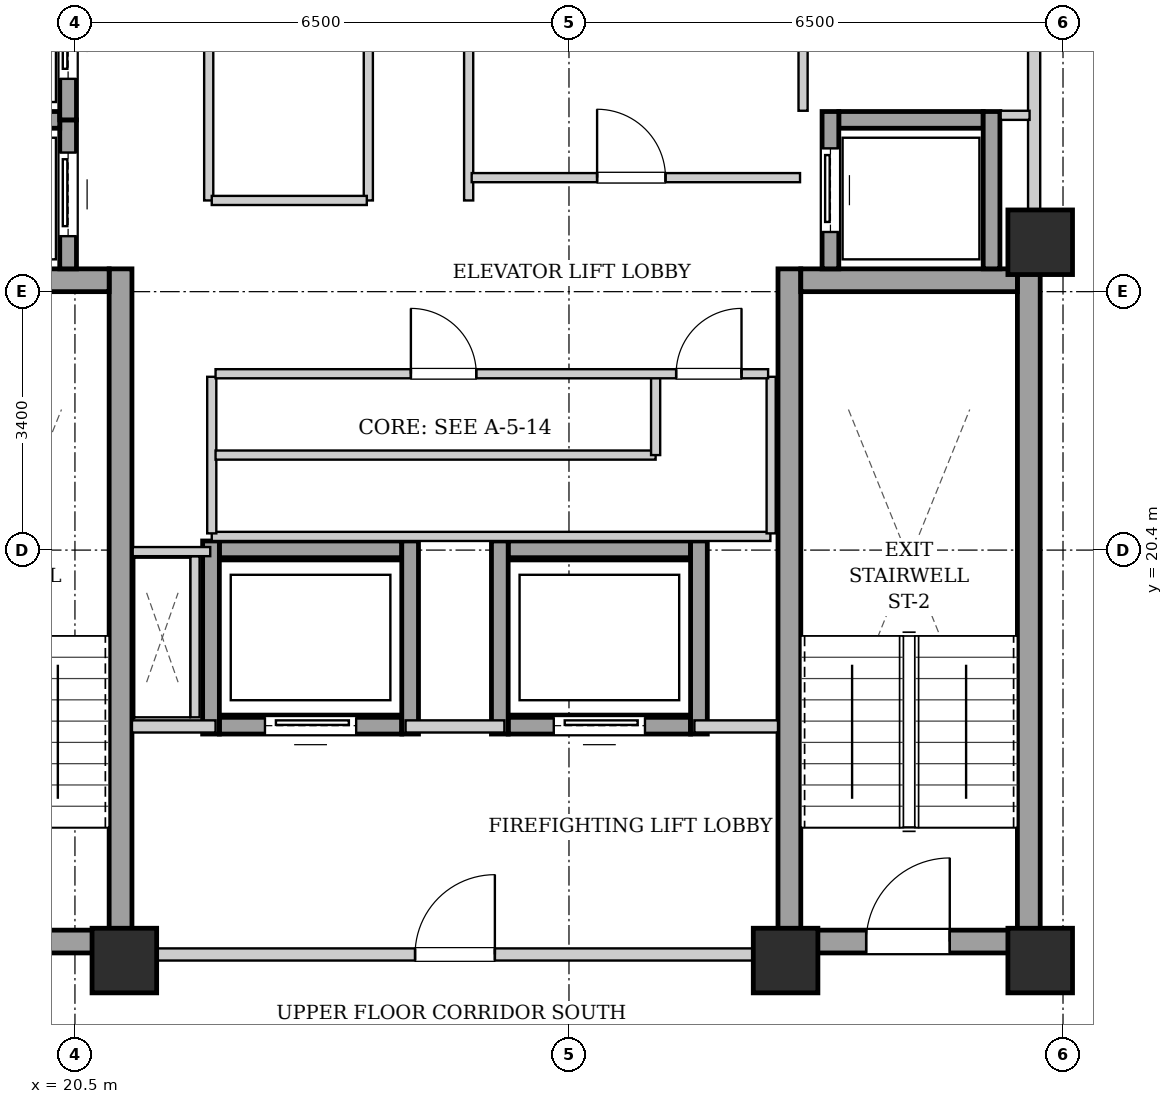
"""IFC4 building model, lengths in metres.
Left out: names, types, materials, properties, quantities, classifications, styles, units other than length and angle.
Written with IfcOpenShell. Run it as: python <this file> out.ifc"""

import sys

from ifc_helpers import new_model, si_unit, direction, frame, frame_2d, origin, origin_2d, place, context, subcontext, project, spatial, rectangle, extrude, element, fill, save


model = new_model("IFC4")
c1 = context("Model", 3, precision=1e-05, world=origin(), true_north=direction((0.0, 1.0)))
c2 = subcontext(c1, "Body", "Model", "MODEL_VIEW")
j1 = project(units=[si_unit("LENGTHUNIT", "METRE"), si_unit("PLANEANGLEUNIT", "RADIAN")], contexts=[c1])
p1 = place(None, origin())
s1 = spatial("IfcSite", under=j1, at=p1, CompositionType="ELEMENT")
p2 = place(p1, origin())
s2 = spatial("IfcBuilding", under=s1, at=p2, CompositionType="ELEMENT")
p3 = place(p2, frame((0.0, 0.0, 181.0)))
s3 = spatial("IfcBuildingStorey", under=s2, at=p3, CompositionType="ELEMENT", Elevation=181.0)
for number, where, z_axis, x_axis in (
    (1, (21.15, 15.0, 0.0), (0.0, 0.0, 1.0), (1.0, 0.0, 0.0)),
    (2, (29.85, 15.0, 0.0), (0.0, 0.0, 1.0), (1.0, 0.0, 0.0)),
    (3, (33.2, 15.0, 0.0), (0.0, 0.0, 1.0), (1.0, 0.0, 0.0)),
    (4, (33.2, 24.45, 0.0), (0.0, 0.0, 1.0), (1.0, 0.0, 0.0)),
):
    element("IfcColumn", number, at=place(p3, frame(where, z_axis=z_axis, x_axis=x_axis)), inside=s3, PredefinedType="COLUMN", context=c2, shape_type="SweptSolid", body=[
        extrude(rectangle(XDim=0.85, YDim=0.85, at=origin_2d()), origin(), (0.0, 0.0, 1.0), 3.3),
    ])
p4 = place(p3, frame((21.1, 15.1, 0.0), z_axis=(0.0, 0.0, 1.0), x_axis=(0.0, 1.0, 0.0)))
e5 = element("IfcWall", 5, at=p4, inside=s3, PredefinedType="SHEAR", context=c2, shape_type="SweptSolid", body=[
    extrude(rectangle(XDim=9.0, YDim=0.3, at=frame_2d((4.5, 0.0))), origin(), (0.0, 0.0, 1.0), 3.04),
])
p5 = place(p3, frame((18.1, 23.95, 0.0), z_axis=(0.0, 0.0, 1.0), x_axis=(1.0, 0.0, 0.0)))
e6 = element("IfcWall", 6, at=p5, inside=s3, PredefinedType="SHEAR", context=c2, shape_type="SweptSolid", body=[
    extrude(rectangle(XDim=2.85, YDim=0.3, at=frame_2d((1.425, 0.0))), origin(), (0.0, 0.0, 1.0), 3.04),
])
p6 = place(p3, frame((18.1, 15.25, 0.0), z_axis=(0.0, 0.0, 1.0), x_axis=(1.0, 0.0, 0.0)))
e7 = element("IfcWall", 7, at=p6, inside=s3, PredefinedType="SHEAR", context=c2, shape_type="SweptSolid", body=[
    extrude(rectangle(XDim=2.85, YDim=0.3, at=frame_2d((1.425, 0.0))), origin(), (0.0, 0.0, 1.0), 3.04),
])
p7 = place(p6, frame((0.86, 0.0, 0.0)))
e8 = element("IfcOpeningElement", 8, at=p7, cuts=e7, PredefinedType="OPENING", context=c2, shape_type="SweptSolid", body=[
    extrude(rectangle(XDim=1.1, YDim=2.05, at=frame_2d((0.55, 1.025))), frame((0.0, 0.16, 0.0), z_axis=(0.0, -1.0, 0.0), x_axis=(1.0, 0.0, 0.0)), (0.0, 0.0, 1.0), 0.32),
])
for number, where, z_axis, x_axis in (
    (9, (29.9, 15.1, 0.0), (0.0, 0.0, 1.0), (0.0, 1.0, 0.0)),
    (10, (33.05, 15.1, 0.0), (0.0, 0.0, 1.0), (0.0, 1.0, 0.0)),
):
    element("IfcWall", number, at=place(p3, frame(where, z_axis=z_axis, x_axis=x_axis)), inside=s3, PredefinedType="SHEAR", context=c2, shape_type="SweptSolid", body=[
        extrude(rectangle(XDim=9.0, YDim=0.3, at=frame_2d((4.5, 0.0))), origin(), (0.0, 0.0, 1.0), 3.04),
    ])
p8 = place(p3, frame((30.05, 23.95, 0.0), z_axis=(0.0, 0.0, 1.0), x_axis=(1.0, 0.0, 0.0)))
e11 = element("IfcWall", 11, at=p8, inside=s3, PredefinedType="SHEAR", context=c2, shape_type="SweptSolid", body=[
    extrude(rectangle(XDim=2.85, YDim=0.3, at=frame_2d((1.425, 0.0))), origin(), (0.0, 0.0, 1.0), 3.04),
])
p9 = place(p3, frame((30.05, 15.25, 0.0), z_axis=(0.0, 0.0, 1.0), x_axis=(1.0, 0.0, 0.0)))
e12 = element("IfcWall", 12, at=p9, inside=s3, PredefinedType="SHEAR", context=c2, shape_type="SweptSolid", body=[
    extrude(rectangle(XDim=2.85, YDim=0.3, at=frame_2d((1.425, 0.0))), origin(), (0.0, 0.0, 1.0), 3.04),
])
p10 = place(p9, frame((0.86, 0.0, 0.0)))
e13 = element("IfcOpeningElement", 13, at=p10, cuts=e12, PredefinedType="OPENING", context=c2, shape_type="SweptSolid", body=[
    extrude(rectangle(XDim=1.1, YDim=2.05, at=frame_2d((0.55, 1.025))), frame((0.0, 0.16, 0.0), z_axis=(0.0, -1.0, 0.0), x_axis=(1.0, 0.0, 0.0)), (0.0, 0.0, 1.0), 0.32),
])
p11 = place(p3, frame((20.41, 24.1, 0.0), z_axis=(0.0, 0.0, 1.0), x_axis=(0.0, 1.0, 0.0)))
e14 = element("IfcWall", 14, at=p11, inside=s3, PredefinedType="SHEAR", context=c2, shape_type="SweptSolid", body=[
    extrude(rectangle(XDim=1.96, YDim=0.22, at=frame_2d((0.98, 0.0))), origin(), (0.0, 0.0, 1.0), 3.04),
])
p12 = place(p11, frame((0.43, 0.0, 0.0)))
e15 = element("IfcOpeningElement", 15, at=p12, cuts=e14, PredefinedType="OPENING", context=c2, shape_type="SweptSolid", body=[
    extrude(rectangle(XDim=1.1, YDim=2.15, at=frame_2d((0.55, 1.075))), frame((0.0, 0.12, 0.0), z_axis=(0.0, -1.0, 0.0), x_axis=(1.0, 0.0, 0.0)), (0.0, 0.0, 1.0), 0.24),
])
p13 = place(p3, frame((18.4, 26.06, 0.0), z_axis=(0.0, 0.0, 1.0), x_axis=(1.0, 0.0, 0.0)))
e16 = element("IfcWall", 16, at=p13, inside=s3, PredefinedType="SHEAR", context=c2, shape_type="SweptSolid", body=[
    extrude(rectangle(XDim=1.9, YDim=0.22, at=frame_2d((0.95, 0.0))), origin(), (0.0, 0.0, 1.0), 3.04),
])
p14 = place(p3, frame((20.41, 26.06, 0.0), z_axis=(0.0, 0.0, 1.0), x_axis=(0.0, 1.0, 0.0)))
e17 = element("IfcWall", 17, at=p14, inside=s3, PredefinedType="SHEAR", context=c2, shape_type="SweptSolid", body=[
    extrude(rectangle(XDim=2.18, YDim=0.22, at=frame_2d((1.09, 0.0))), origin(), (0.0, 0.0, 1.0), 3.04),
])
p15 = place(p14, frame((0.54, 0.0, 0.0)))
e18 = element("IfcOpeningElement", 18, at=p15, cuts=e17, PredefinedType="OPENING", context=c2, shape_type="SweptSolid", body=[
    extrude(rectangle(XDim=1.1, YDim=2.15, at=frame_2d((0.55, 1.075))), frame((0.0, 0.12, 0.0), z_axis=(0.0, -1.0, 0.0), x_axis=(1.0, 0.0, 0.0)), (0.0, 0.0, 1.0), 0.24),
])
p16 = place(p3, frame((30.55, 26.06, 0.0), z_axis=(0.0, 0.0, 1.0), x_axis=(1.0, 0.0, 0.0)))
e19 = element("IfcWall", 19, at=p16, inside=s3, PredefinedType="SHEAR", context=c2, shape_type="SweptSolid", body=[
    extrude(rectangle(XDim=1.9, YDim=0.22, at=frame_2d((0.95, 0.0))), origin(), (0.0, 0.0, 1.0), 3.04),
])
p17 = place(p3, frame((30.44, 24.1, 0.0), z_axis=(0.0, 0.0, 1.0), x_axis=(0.0, 1.0, 0.0)))
e20 = element("IfcWall", 20, at=p17, inside=s3, PredefinedType="SHEAR", context=c2, shape_type="SweptSolid", body=[
    extrude(rectangle(XDim=2.07, YDim=0.22, at=frame_2d((1.035, 0.0))), origin(), (0.0, 0.0, 1.0), 3.04),
])
p18 = place(p17, frame((0.485, 0.0, 0.0)))
e21 = element("IfcOpeningElement", 21, at=p18, cuts=e20, PredefinedType="OPENING", context=c2, shape_type="SweptSolid", body=[
    extrude(rectangle(XDim=1.1, YDim=2.15, at=frame_2d((0.55, 1.075))), frame((0.0, 0.12, 0.0), z_axis=(0.0, -1.0, 0.0), x_axis=(1.0, 0.0, 0.0)), (0.0, 0.0, 1.0), 0.24),
])
p19 = place(p3, frame((32.56, 24.1, 0.0), z_axis=(0.0, 0.0, 1.0), x_axis=(0.0, 1.0, 0.0)))
e22 = element("IfcWall", 22, at=p19, inside=s3, PredefinedType="SHEAR", context=c2, shape_type="SweptSolid", body=[
    extrude(rectangle(XDim=2.07, YDim=0.22, at=frame_2d((1.035, 0.0))), origin(), (0.0, 0.0, 1.0), 3.04),
])
p20 = place(p3, frame((22.4, 18.09, 0.0), z_axis=(0.0, 0.0, 1.0), x_axis=(1.0, 0.0, 0.0)))
e23 = element("IfcWall", 23, at=p20, inside=s3, PredefinedType="SHEAR", context=c2, shape_type="SweptSolid", body=[
    extrude(rectangle(XDim=2.4, YDim=0.22, at=frame_2d((1.2, 0.0))), origin(), (0.0, 0.0, 1.0), 3.04),
])
p21 = place(p20, frame((0.6, 0.0, 0.0)))
e24 = element("IfcOpeningElement", 24, at=p21, cuts=e23, PredefinedType="OPENING", context=c2, shape_type="SweptSolid", body=[
    extrude(rectangle(XDim=1.2, YDim=2.15, at=frame_2d((0.6, 1.075))), frame((0.0, 0.12, 0.0), z_axis=(0.0, -1.0, 0.0), x_axis=(1.0, 0.0, 0.0)), (0.0, 0.0, 1.0), 0.24),
])
p22 = place(p3, frame((22.4, 20.41, 0.0), z_axis=(0.0, 0.0, 1.0), x_axis=(1.0, 0.0, 0.0)))
e25 = element("IfcWall", 25, at=p22, inside=s3, PredefinedType="SHEAR", context=c2, shape_type="SweptSolid", body=[
    extrude(rectangle(XDim=2.4, YDim=0.22, at=frame_2d((1.2, 0.0))), origin(), (0.0, 0.0, 1.0), 3.04),
])
for number, where, z_axis, x_axis in (
    (26, (22.29, 17.98, 0.0), (0.0, 0.0, 1.0), (0.0, 1.0, 0.0)),
    (27, (24.91, 17.98, 0.0), (0.0, 0.0, 1.0), (0.0, 1.0, 0.0)),
):
    element("IfcWall", number, at=place(p3, frame(where, z_axis=z_axis, x_axis=x_axis)), inside=s3, PredefinedType="SHEAR", context=c2, shape_type="SweptSolid", body=[
        extrude(rectangle(XDim=2.54, YDim=0.22, at=frame_2d((1.27, 0.0))), origin(), (0.0, 0.0, 1.0), 3.04),
    ])
p23 = place(p3, frame((26.2, 18.09, 0.0), z_axis=(0.0, 0.0, 1.0), x_axis=(1.0, 0.0, 0.0)))
e28 = element("IfcWall", 28, at=p23, inside=s3, PredefinedType="SHEAR", context=c2, shape_type="SweptSolid", body=[
    extrude(rectangle(XDim=2.4, YDim=0.22, at=frame_2d((1.2, 0.0))), origin(), (0.0, 0.0, 1.0), 3.04),
])
p24 = place(p23, frame((0.6, 0.0, 0.0)))
e29 = element("IfcOpeningElement", 29, at=p24, cuts=e28, PredefinedType="OPENING", context=c2, shape_type="SweptSolid", body=[
    extrude(rectangle(XDim=1.2, YDim=2.15, at=frame_2d((0.6, 1.075))), frame((0.0, 0.12, 0.0), z_axis=(0.0, -1.0, 0.0), x_axis=(1.0, 0.0, 0.0)), (0.0, 0.0, 1.0), 0.24),
])
p25 = place(p3, frame((26.2, 20.41, 0.0), z_axis=(0.0, 0.0, 1.0), x_axis=(1.0, 0.0, 0.0)))
e30 = element("IfcWall", 30, at=p25, inside=s3, PredefinedType="SHEAR", context=c2, shape_type="SweptSolid", body=[
    extrude(rectangle(XDim=2.4, YDim=0.22, at=frame_2d((1.2, 0.0))), origin(), (0.0, 0.0, 1.0), 3.04),
])
for number, where, z_axis, x_axis in (
    (31, (26.09, 17.98, 0.0), (0.0, 0.0, 1.0), (0.0, 1.0, 0.0)),
    (32, (28.71, 17.98, 0.0), (0.0, 0.0, 1.0), (0.0, 1.0, 0.0)),
):
    element("IfcWall", number, at=place(p3, frame(where, z_axis=z_axis, x_axis=x_axis)), inside=s3, PredefinedType="SHEAR", context=c2, shape_type="SweptSolid", body=[
        extrude(rectangle(XDim=2.54, YDim=0.22, at=frame_2d((1.27, 0.0))), origin(), (0.0, 0.0, 1.0), 3.04),
    ])
p26 = place(p3, frame((21.25, 15.08, 0.0), z_axis=(0.0, 0.0, 1.0), x_axis=(1.0, 0.0, 0.0)))
e33 = element("IfcWall", 33, at=p26, inside=s3, PredefinedType="PARTITIONING", context=c2, shape_type="SweptSolid", body=[
    extrude(rectangle(XDim=8.5, YDim=0.16, at=frame_2d((4.25, 0.0))), origin(), (0.0, 0.0, 1.0), 2.556),
])
p27 = place(p26, frame((3.725, 0.0, 0.0)))
e34 = element("IfcOpeningElement", 34, at=p27, cuts=e33, PredefinedType="OPENING", context=c2, shape_type="SweptSolid", body=[
    extrude(rectangle(XDim=1.05, YDim=2.05, at=frame_2d((0.525, 1.025))), frame((0.0, 0.09, 0.0), z_axis=(0.0, -1.0, 0.0), x_axis=(1.0, 0.0, 0.0)), (0.0, 0.0, 1.0), 0.18),
])
p28 = place(p3, frame((21.25, 18.08, 0.0), z_axis=(0.0, 0.0, 1.0), x_axis=(1.0, 0.0, 0.0)))
e35 = element("IfcWall", 35, at=p28, inside=s3, PredefinedType="PARTITIONING", context=c2, shape_type="SweptSolid", body=[
    extrude(rectangle(XDim=1.1, YDim=0.16, at=frame_2d((0.55, 0.0))), origin(), (0.0, 0.0, 1.0), 3.04),
])
p29 = place(p3, frame((24.85, 18.08, 0.0), z_axis=(0.0, 0.0, 1.0), x_axis=(1.0, 0.0, 0.0)))
e36 = element("IfcWall", 36, at=p29, inside=s3, PredefinedType="PARTITIONING", context=c2, shape_type="SweptSolid", body=[
    extrude(rectangle(XDim=1.3, YDim=0.16, at=frame_2d((0.65, 0.0))), origin(), (0.0, 0.0, 1.0), 3.04),
])
p30 = place(p3, frame((28.65, 18.08, 0.0), z_axis=(0.0, 0.0, 1.0), x_axis=(1.0, 0.0, 0.0)))
e37 = element("IfcWall", 37, at=p30, inside=s3, PredefinedType="PARTITIONING", context=c2, shape_type="SweptSolid", body=[
    extrude(rectangle(XDim=1.1, YDim=0.16, at=frame_2d((0.55, 0.0))), origin(), (0.0, 0.0, 1.0), 3.04),
])
p31 = place(p3, frame((33.12, 24.12, 0.0), z_axis=(0.0, 0.0, 1.0), x_axis=(0.0, 1.0, 0.0)))
e38 = element("IfcWall", 38, at=p31, inside=s3, PredefinedType="PARTITIONING", context=c2, shape_type="SweptSolid", body=[
    extrude(rectangle(XDim=4.76, YDim=0.16, at=frame_2d((2.38, 0.0))), origin(), (0.0, 0.0, 1.0), 3.04),
])
p32 = place(p3, frame((22.08, 18.2, 0.0), z_axis=(0.0, 0.0, 1.0), x_axis=(0.0, 1.0, 0.0)))
e39 = element("IfcWall", 39, at=p32, inside=s3, PredefinedType="PARTITIONING", context=c2, shape_type="SweptSolid", body=[
    extrude(rectangle(XDim=2.12, YDim=0.12, at=frame_2d((1.06, 0.0))), origin(), (0.0, 0.0, 1.0), 3.04),
])
p33 = place(p3, frame((22.28, 20.38, 0.0), z_axis=(0.0, 0.0, 1.0), x_axis=(-1.0, 0.0, 0.0)))
e40 = element("IfcWall", 40, at=p33, inside=s3, PredefinedType="PARTITIONING", context=c2, shape_type="SweptSolid", body=[
    extrude(rectangle(XDim=1.02, YDim=0.12, at=frame_2d((0.51, 0.0))), origin(), (0.0, 0.0, 1.0), 3.04),
])
for number, where, z_axis, x_axis in (
    (41, (24.36, 25.0, 0.0), (0.0, 0.0, 1.0), (0.0, 1.0, 0.0)),
    (42, (25.68, 25.0, 0.0), (0.0, 0.0, 1.0), (0.0, 1.0, 0.0)),
):
    element("IfcWall", number, at=place(p3, frame(where, z_axis=z_axis, x_axis=x_axis)), inside=s3, PredefinedType="PARTITIONING", context=c2, shape_type="SweptSolid", body=[
        extrude(rectangle(XDim=3.87, YDim=0.12, at=frame_2d((1.935, 0.0))), origin(), (0.0, 0.0, 1.0), 3.04),
    ])
p34 = place(p3, frame((30.08, 26.18, 0.0), z_axis=(0.0, 0.0, 1.0), x_axis=(0.0, 1.0, 0.0)))
e43 = element("IfcWall", 43, at=p34, inside=s3, PredefinedType="PARTITIONING", context=c2, shape_type="SweptSolid", body=[
    extrude(rectangle(XDim=1.28, YDim=0.12, at=frame_2d((0.64, 0.0))), origin(), (0.0, 0.0, 1.0), 3.04),
])
p35 = place(p3, frame((32.68, 26.12, 0.0), z_axis=(0.0, 0.0, 1.0), x_axis=(1.0, 0.0, 0.0)))
e44 = element("IfcWall", 44, at=p35, inside=s3, PredefinedType="PARTITIONING", context=c2, shape_type="SweptSolid", body=[
    extrude(rectangle(XDim=0.38, YDim=0.12, at=frame_2d((0.19, 0.0))), origin(), (0.0, 0.0, 1.0), 3.04),
])
p36 = place(p3, frame((22.26, 25.0, 0.0), z_axis=(0.0, 0.0, 1.0), x_axis=(0.0, 1.0, 0.0)))
e45 = element("IfcWall", 45, at=p36, inside=s3, PredefinedType="PARTITIONING", context=c2, shape_type="SweptSolid", body=[
    extrude(rectangle(XDim=3.86, YDim=0.12, at=frame_2d((1.93, 0.0))), origin(), (0.0, 0.0, 1.0), 3.04),
])
p37 = place(p3, frame((22.3, 25.0, 0.0), z_axis=(0.0, 0.0, 1.0), x_axis=(1.0, 0.0, 0.0)))
e46 = element("IfcWall", 46, at=p37, inside=s3, PredefinedType="PARTITIONING", context=c2, shape_type="SweptSolid", body=[
    extrude(rectangle(XDim=2.04, YDim=0.12, at=frame_2d((1.02, 0.0))), origin(), (0.0, 0.0, 1.0), 3.04),
])
p38 = place(p3, frame((25.72, 25.3, 0.0), z_axis=(0.0, 0.0, 1.0), x_axis=(1.0, 0.0, 0.0)))
e47 = element("IfcWall", 47, at=p38, inside=s3, PredefinedType="PARTITIONING", context=c2, shape_type="SweptSolid", body=[
    extrude(rectangle(XDim=4.32, YDim=0.12, at=frame_2d((2.16, 0.0))), origin(), (0.0, 0.0, 1.0), 3.04),
])
p39 = place(p38, frame((1.65, 0.0, 0.0)))
e48 = element("IfcOpeningElement", 48, at=p39, cuts=e47, PredefinedType="OPENING", context=c2, shape_type="SweptSolid", body=[
    extrude(rectangle(XDim=0.9, YDim=2.05, at=frame_2d((0.45, 1.025))), frame((0.0, 0.07, 0.0), z_axis=(0.0, -1.0, 0.0), x_axis=(1.0, 0.0, 0.0)), (0.0, 0.0, 1.0), 0.14),
])
p40 = place(p3, frame((22.3, 20.58, 0.0), z_axis=(0.0, 0.0, 1.0), x_axis=(1.0, 0.0, 0.0)))
e49 = element("IfcWall", 49, at=p40, inside=s3, PredefinedType="PARTITIONING", context=c2, shape_type="SweptSolid", body=[
    extrude(rectangle(XDim=7.35, YDim=0.12, at=frame_2d((3.675, 0.0))), origin(), (0.0, 0.0, 1.0), 3.04),
])
for number, where, z_axis, x_axis in (
    (50, (22.3, 20.62, 0.0), (0.0, 0.0, 1.0), (0.0, 1.0, 0.0)),
    (51, (29.66, 20.62, 0.0), (0.0, 0.0, 1.0), (0.0, 1.0, 0.0)),
):
    element("IfcWall", number, at=place(p3, frame(where, z_axis=z_axis, x_axis=x_axis)), inside=s3, PredefinedType="PARTITIONING", context=c2, shape_type="SweptSolid", body=[
        extrude(rectangle(XDim=2.06, YDim=0.12, at=frame_2d((1.03, 0.0))), origin(), (0.0, 0.0, 1.0), 3.04),
    ])
p41 = place(p3, frame((22.35, 21.65, 0.0), z_axis=(0.0, 0.0, 1.0), x_axis=(1.0, 0.0, 0.0)))
e52 = element("IfcWall", 52, at=p41, inside=s3, PredefinedType="PARTITIONING", context=c2, shape_type="SweptSolid", body=[
    extrude(rectangle(XDim=5.79, YDim=0.12, at=frame_2d((2.895, 0.0))), origin(), (0.0, 0.0, 1.0), 3.04),
])
p42 = place(p3, frame((28.14, 21.65, 0.0), z_axis=(0.0, 0.0, 1.0), x_axis=(0.0, 1.0, 0.0)))
e53 = element("IfcWall", 53, at=p42, inside=s3, PredefinedType="PARTITIONING", context=c2, shape_type="SweptSolid", body=[
    extrude(rectangle(XDim=1.03, YDim=0.12, at=frame_2d((0.515, 0.0))), origin(), (0.0, 0.0, 1.0), 3.04),
])
p43 = place(p3, frame((22.35, 22.72, 0.0), z_axis=(0.0, 0.0, 1.0), x_axis=(1.0, 0.0, 0.0)))
e54 = element("IfcWall", 54, at=p43, inside=s3, PredefinedType="PARTITIONING", context=c2, shape_type="SweptSolid", body=[
    extrude(rectangle(XDim=7.27, YDim=0.12, at=frame_2d((3.635, 0.0))), origin(), (0.0, 0.0, 1.0), 3.04),
])
p44 = place(p43, frame((2.57, 0.0, 0.0)))
e55 = element("IfcOpeningElement", 55, at=p44, cuts=e54, PredefinedType="OPENING", context=c2, shape_type="SweptSolid", body=[
    extrude(rectangle(XDim=0.86, YDim=2.05, at=frame_2d((0.43, 1.025))), frame((0.0, 0.07, 0.0), z_axis=(0.0, -1.0, 0.0), x_axis=(1.0, 0.0, 0.0)), (0.0, 0.0, 1.0), 0.14),
])
p45 = place(p43, frame((6.06, 0.0, 0.0)))
e56 = element("IfcOpeningElement", 56, at=p45, cuts=e54, PredefinedType="OPENING", context=c2, shape_type="SweptSolid", body=[
    extrude(rectangle(XDim=0.86, YDim=2.05, at=frame_2d((0.43, 1.025))), frame((0.0, 0.07, 0.0), z_axis=(0.0, -1.0, 0.0), x_axis=(1.0, 0.0, 0.0)), (0.0, 0.0, 1.0), 0.14),
])
p46 = place(p10, origin())
e57 = element("IfcDoor", 57, at=p46, inside=s3, OperationType="SINGLE_SWING_RIGHT", PredefinedType="DOOR", context=c2, shape_type="SweptSolid", body=[
    extrude(rectangle(XDim=1.1, YDim=2.05, at=frame_2d((0.55, 1.025))), frame((0.0, 0.025, 0.0), z_axis=(0.0, -1.0, 0.0), x_axis=(1.0, 0.0, 0.0)), (0.0, 0.0, 1.0), 0.05),
])
fill(e13, e57)
p47 = place(p12, origin())
e58 = element("IfcDoor", 58, at=p47, inside=s3, OperationType="SLIDING_TO_LEFT", PredefinedType="DOOR", context=c2, shape_type="SweptSolid", body=[
    extrude(rectangle(XDim=1.1, YDim=2.15, at=frame_2d((0.55, 1.075))), frame((0.0, 0.025, 0.0), z_axis=(0.0, -1.0, 0.0), x_axis=(1.0, 0.0, 0.0)), (0.0, 0.0, 1.0), 0.05),
])
fill(e15, e58)
p48 = place(p15, origin())
e59 = element("IfcDoor", 59, at=p48, inside=s3, OperationType="SLIDING_TO_LEFT", PredefinedType="DOOR", context=c2, shape_type="SweptSolid", body=[
    extrude(rectangle(XDim=1.1, YDim=2.15, at=frame_2d((0.55, 1.075))), frame((0.0, 0.025, 0.0), z_axis=(0.0, -1.0, 0.0), x_axis=(1.0, 0.0, 0.0)), (0.0, 0.0, 1.0), 0.05),
])
fill(e18, e59)
p49 = place(p18, origin())
e60 = element("IfcDoor", 60, at=p49, inside=s3, OperationType="SLIDING_TO_LEFT", PredefinedType="DOOR", context=c2, shape_type="SweptSolid", body=[
    extrude(rectangle(XDim=1.1, YDim=2.15, at=frame_2d((0.55, 1.075))), frame((0.0, 0.025, 0.0), z_axis=(0.0, -1.0, 0.0), x_axis=(1.0, 0.0, 0.0)), (0.0, 0.0, 1.0), 0.05),
])
fill(e21, e60)
p50 = place(p21, origin())
e61 = element("IfcDoor", 61, at=p50, inside=s3, OperationType="SLIDING_TO_LEFT", PredefinedType="DOOR", context=c2, shape_type="SweptSolid", body=[
    extrude(rectangle(XDim=1.2, YDim=2.15, at=frame_2d((0.6, 1.075))), frame((0.0, 0.025, 0.0), z_axis=(0.0, -1.0, 0.0), x_axis=(1.0, 0.0, 0.0)), (0.0, 0.0, 1.0), 0.05),
])
fill(e24, e61)
p51 = place(p24, origin())
e62 = element("IfcDoor", 62, at=p51, inside=s3, OperationType="SLIDING_TO_LEFT", PredefinedType="DOOR", context=c2, shape_type="SweptSolid", body=[
    extrude(rectangle(XDim=1.2, YDim=2.15, at=frame_2d((0.6, 1.075))), frame((0.0, 0.025, 0.0), z_axis=(0.0, -1.0, 0.0), x_axis=(1.0, 0.0, 0.0)), (0.0, 0.0, 1.0), 0.05),
])
fill(e29, e62)
p52 = place(p27, origin())
e63 = element("IfcDoor", 63, at=p52, inside=s3, OperationType="SINGLE_SWING_RIGHT", PredefinedType="DOOR", context=c2, shape_type="SweptSolid", body=[
    extrude(rectangle(XDim=1.05, YDim=2.05, at=frame_2d((0.525, 1.025))), frame((0.0, 0.025, 0.0), z_axis=(0.0, -1.0, 0.0), x_axis=(1.0, 0.0, 0.0)), (0.0, 0.0, 1.0), 0.05),
])
fill(e34, e63)
p53 = place(p39, origin())
e64 = element("IfcDoor", 64, at=p53, inside=s3, OperationType="SINGLE_SWING_LEFT", PredefinedType="DOOR", context=c2, shape_type="SweptSolid", body=[
    extrude(rectangle(XDim=0.9, YDim=2.05, at=frame_2d((0.45, 1.025))), frame((0.0, 0.025, 0.0), z_axis=(0.0, -1.0, 0.0), x_axis=(1.0, 0.0, 0.0)), (0.0, 0.0, 1.0), 0.05),
])
fill(e48, e64)
p54 = place(p44, origin())
e65 = element("IfcDoor", 65, at=p54, inside=s3, OperationType="SINGLE_SWING_LEFT", PredefinedType="DOOR", context=c2, shape_type="SweptSolid", body=[
    extrude(rectangle(XDim=0.86, YDim=2.05, at=frame_2d((0.43, 1.025))), frame((0.0, 0.025, 0.0), z_axis=(0.0, -1.0, 0.0), x_axis=(1.0, 0.0, 0.0)), (0.0, 0.0, 1.0), 0.05),
])
fill(e55, e65)
p55 = place(p45, origin())
e66 = element("IfcDoor", 66, at=p55, inside=s3, OperationType="SINGLE_SWING_RIGHT", PredefinedType="DOOR", context=c2, shape_type="SweptSolid", body=[
    extrude(rectangle(XDim=0.86, YDim=2.05, at=frame_2d((0.43, 1.025))), frame((0.0, 0.025, 0.0), z_axis=(0.0, -1.0, 0.0), x_axis=(1.0, 0.0, 0.0)), (0.0, 0.0, 1.0), 0.05),
])
fill(e56, e66)
save(model, sys.argv[1])
